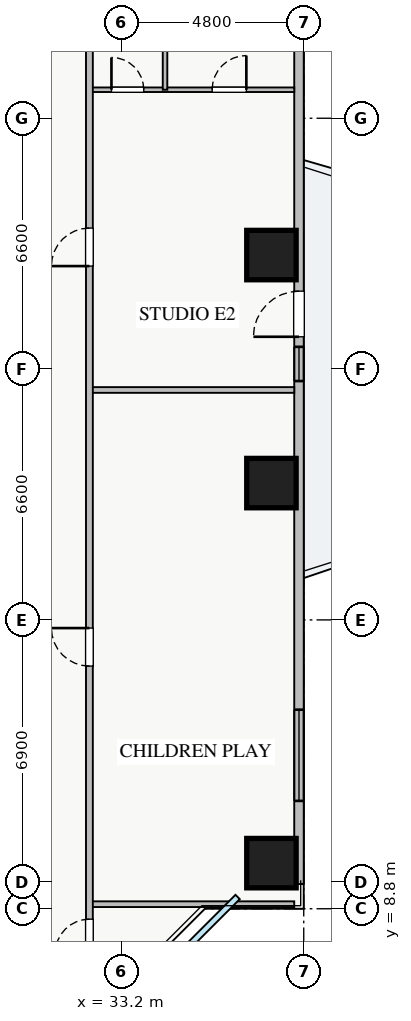
"""IFC4 building model, lengths in metres.
Left out: names, types, materials, properties, quantities, classifications, styles, units other than length and angle.
Written with IfcOpenShell. Run it as: python <this file> out.ifc"""

import sys

from ifc_helpers import new_model, si_unit, direction, frame, frame_2d, origin, origin_2d, place, context, subcontext, project, spatial, rectangle, extrude, source, transform, mapped, element, fill, save


model = new_model("IFC4")
c1 = context("Model", 3, precision=1e-05, world=origin(), true_north=direction((0.0, 1.0)))
c2 = subcontext(c1, "Body", "Model", "MODEL_VIEW")
j1 = project(units=[si_unit("LENGTHUNIT", "METRE"), si_unit("PLANEANGLEUNIT", "RADIAN")], contexts=[c1])
p1 = place(None, origin())
s1 = spatial("IfcSite", under=j1, at=p1, CompositionType="ELEMENT")
p2 = place(p1, origin())
s2 = spatial("IfcBuilding", under=s1, at=p2, CompositionType="ELEMENT")
p3 = place(p2, frame((0.0, 0.0, 63.25)))
s3 = spatial("IfcBuildingStorey", under=s2, at=p3, CompositionType="ELEMENT", Elevation=63.25)
m1 = source(origin(), c2, "Body", "SweptSolid", [
    extrude(rectangle(XDim=1.3, YDim=1.3, at=origin_2d()), origin(), (0.0, 0.0, 1.0), 3.25),
])
for number, where, z_axis, x_axis in (
    (1, (37.15, 10.0, 0.0), (0.0, 0.0, 1.0), (1.0, 0.0, 0.0)),
    (2, (37.15, 20.0, 0.0), (0.0, 0.0, 1.0), (1.0, 0.0, 0.0)),
    (3, (37.15, 26.0, 0.0), (0.0, 0.0, 1.0), (1.0, 0.0, 0.0)),
):
    element("IfcColumn", number, at=place(p3, frame(where, z_axis=z_axis, x_axis=x_axis)), inside=s3, PredefinedType="COLUMN", context=c2, shape_type="MappedRepresentation", body=[
        mapped(m1, transform((0.0, 0.0, 0.0), x_axis=(1.0, 0.0, 0.0), y_axis=(0.0, 1.0, 0.0), z_axis=(0.0, 0.0, 1.0), scale=1.0)),
    ])
p4 = place(p3, frame((37.875, 9.45, 0.0), z_axis=(0.0, 0.0, 1.0), x_axis=(0.0, 1.0, 0.0)))
e4 = element("IfcWall", 4, at=p4, inside=s3, PredefinedType="STANDARD", context=c2, shape_type="SweptSolid", body=[
    extrude(rectangle(XDim=27.1, YDim=0.25, at=frame_2d((13.55, 0.0))), origin(), (0.0, 0.0, 1.0), 2.61),
])
p5 = place(p4, frame((14.4, 0.0, 0.0)))
e5 = element("IfcOpeningElement", 5, at=p5, cuts=e4, PredefinedType="OPENING", context=c2, shape_type="SweptSolid", body=[
    extrude(rectangle(XDim=1.2, YDim=2.1, at=frame_2d((0.6, 1.05))), frame((0.0, 0.135, 0.0), z_axis=(0.0, -1.0, 0.0), x_axis=(1.0, 0.0, 0.0)), (0.0, 0.0, 1.0), 0.27),
])
p6 = place(p4, frame((2.188, 0.0, 0.9)))
e6 = element("IfcOpeningElement", 6, at=p6, cuts=e4, PredefinedType="OPENING", context=c2, shape_type="SweptSolid", body=[
    extrude(rectangle(XDim=2.4, YDim=1.48, at=frame_2d((1.2, 0.74))), frame((0.0, 0.135, 0.0), z_axis=(0.0, -1.0, 0.0), x_axis=(1.0, 0.0, 0.0)), (0.0, 0.0, 1.0), 0.27),
])
p7 = place(p4, frame((22.663, 0.0, 0.9)))
e7 = element("IfcOpeningElement", 7, at=p7, cuts=e4, PredefinedType="OPENING", context=c2, shape_type="SweptSolid", body=[
    extrude(rectangle(XDim=2.1, YDim=1.48, at=frame_2d((1.05, 0.74))), frame((0.0, 0.135, 0.0), z_axis=(0.0, -1.0, 0.0), x_axis=(1.0, 0.0, 0.0)), (0.0, 0.0, 1.0), 0.27),
])
p8 = place(p4, frame((13.235, 0.0, 0.9)))
e8 = element("IfcOpeningElement", 8, at=p8, cuts=e4, PredefinedType="OPENING", context=c2, shape_type="SweptSolid", body=[
    extrude(rectangle(XDim=0.9, YDim=1.2, at=frame_2d((0.45, 0.6))), frame((0.0, 0.135, 0.0), z_axis=(0.0, -1.0, 0.0), x_axis=(1.0, 0.0, 0.0)), (0.0, 0.0, 1.0), 0.27),
])
p9 = place(p3, frame((32.36, 8.92, 0.0), z_axis=(0.0, 0.0, 1.0), x_axis=(1.0, 0.0, 0.0)))
e9 = element("IfcWall", 9, at=p9, inside=s3, PredefinedType="PARTITIONING", context=c2, shape_type="SweptSolid", body=[
    extrude(rectangle(XDim=5.39, YDim=0.15, at=frame_2d((2.695, 0.0))), origin(), (0.0, 0.0, 1.0), 3.07),
])
p10 = place(p3, frame((32.36, 30.35, 0.0), z_axis=(0.0, 0.0, 1.0), x_axis=(1.0, 0.0, 0.0)))
e10 = element("IfcWall", 10, at=p10, inside=s3, PredefinedType="PLUMBINGWALL", context=c2, shape_type="SweptSolid", body=[
    extrude(rectangle(XDim=5.39, YDim=0.12, at=frame_2d((2.695, 0.0))), origin(), (0.0, 0.0, 1.0), 3.07),
])
p11 = place(p10, frame((0.58, 0.0, 0.0)))
e11 = element("IfcOpeningElement", 11, at=p11, cuts=e10, PredefinedType="OPENING", context=c2, shape_type="SweptSolid", body=[
    extrude(rectangle(XDim=0.85, YDim=2.05, at=frame_2d((0.425, 1.025))), frame((0.0, 0.07, 0.0), z_axis=(0.0, -1.0, 0.0), x_axis=(1.0, 0.0, 0.0)), (0.0, 0.0, 1.0), 0.14),
])
p12 = place(p10, frame((3.23, 0.0, 0.0)))
e12 = element("IfcOpeningElement", 12, at=p12, cuts=e10, PredefinedType="OPENING", context=c2, shape_type="SweptSolid", body=[
    extrude(rectangle(XDim=0.9, YDim=2.05, at=frame_2d((0.45, 1.025))), frame((0.0, 0.07, 0.0), z_axis=(0.0, -1.0, 0.0), x_axis=(1.0, 0.0, 0.0)), (0.0, 0.0, 1.0), 0.14),
])
p13 = place(p3, frame((34.35, 30.35, 0.0), z_axis=(0.0, 0.0, 1.0), x_axis=(0.0, 1.0, 0.0)))
e13 = element("IfcWall", 13, at=p13, inside=s3, PredefinedType="PLUMBINGWALL", context=c2, shape_type="SweptSolid", body=[
    extrude(rectangle(XDim=6.73, YDim=0.12, at=frame_2d((3.365, 0.0))), origin(), (0.0, 0.0, 1.0), 3.07),
])
p14 = place(p3, frame((32.36, 22.45, 0.0), z_axis=(0.0, 0.0, 1.0), x_axis=(1.0, 0.0, 0.0)))
e14 = element("IfcWall", 14, at=p14, inside=s3, PredefinedType="PARTITIONING", context=c2, shape_type="SweptSolid", body=[
    extrude(rectangle(XDim=5.39, YDim=0.15, at=frame_2d((2.695, 0.0))), origin(), (0.0, 0.0, 1.0), 3.07),
])
p15 = place(p3, frame((32.36, 7.21, 0.0), z_axis=(0.0, 0.0, 1.0), x_axis=(0.0, 1.0, 0.0)))
e15 = element("IfcWall", 15, at=p15, inside=s3, PredefinedType="PARTITIONING", context=c2, shape_type="SweptSolid", body=[
    extrude(rectangle(XDim=31.23, YDim=0.18, at=frame_2d((15.615, 0.0))), origin(), (0.0, 0.0, 1.0), 2.865),
])
p16 = place(p15, frame((30.09, 0.0, 0.0)))
e16 = element("IfcOpeningElement", 16, at=p16, cuts=e15, PredefinedType="OPENING", context=c2, shape_type="SweptSolid", body=[
    extrude(rectangle(XDim=0.9, YDim=2.05, at=frame_2d((0.45, 1.025))), frame((0.0, 0.1, 0.0), z_axis=(0.0, -1.0, 0.0), x_axis=(1.0, 0.0, 0.0)), (0.0, 0.0, 1.0), 0.2),
])
p17 = place(p15, frame((0.415, 0.0, 0.0)))
e17 = element("IfcOpeningElement", 17, at=p17, cuts=e15, PredefinedType="OPENING", context=c2, shape_type="SweptSolid", body=[
    extrude(rectangle(XDim=0.9, YDim=2.05, at=frame_2d((0.45, 1.025))), frame((0.0, 0.1, 0.0), z_axis=(0.0, -1.0, 0.0), x_axis=(1.0, 0.0, 0.0)), (0.0, 0.0, 1.0), 0.2),
])
p18 = place(p15, frame((7.975, 0.0, 0.0)))
e18 = element("IfcOpeningElement", 18, at=p18, cuts=e15, PredefinedType="OPENING", context=c2, shape_type="SweptSolid", body=[
    extrude(rectangle(XDim=1.0, YDim=2.05, at=frame_2d((0.5, 1.025))), frame((0.0, 0.1, 0.0), z_axis=(0.0, -1.0, 0.0), x_axis=(1.0, 0.0, 0.0)), (0.0, 0.0, 1.0), 0.2),
])
p19 = place(p15, frame((18.5, 0.0, 0.0)))
e19 = element("IfcOpeningElement", 19, at=p19, cuts=e15, PredefinedType="OPENING", context=c2, shape_type="SweptSolid", body=[
    extrude(rectangle(XDim=1.0, YDim=2.05, at=frame_2d((0.5, 1.025))), frame((0.0, 0.1, 0.0), z_axis=(0.0, -1.0, 0.0), x_axis=(1.0, 0.0, 0.0)), (0.0, 0.0, 1.0), 0.2),
])
m2 = source(origin(), c2, "Body", "SweptSolid", [
    extrude(rectangle(XDim=1.2, YDim=2.1, at=frame_2d((0.6, 1.05))), frame((0.0, 0.025, 0.0), z_axis=(0.0, -1.0, 0.0), x_axis=(1.0, 0.0, 0.0)), (0.0, 0.0, 1.0), 0.05),
])
p20 = place(p5, origin())
e20 = element("IfcDoor", 20, at=p20, inside=s3, OperationType="SINGLE_SWING_LEFT", PredefinedType="DOOR", context=c2, shape_type="MappedRepresentation", body=[
    mapped(m2, transform((0.0, 0.0, 0.0), x_axis=(1.0, 0.0, 0.0), y_axis=(0.0, 1.0, 0.0), z_axis=(0.0, 0.0, 1.0), scale=1.0)),
])
fill(e5, e20)
m3 = source(origin(), c2, "Body", "SweptSolid", [
    extrude(rectangle(XDim=2.4, YDim=1.48, at=frame_2d((1.2, 0.74))), frame((0.0, 0.03, 0.0), z_axis=(0.0, -1.0, 0.0), x_axis=(1.0, 0.0, 0.0)), (0.0, 0.0, 1.0), 0.06),
])
p21 = place(p6, origin())
e21 = element("IfcWindow", 21, at=p21, inside=s3, PartitioningType="TRIPLE_PANEL_VERTICAL", PredefinedType="WINDOW", context=c2, shape_type="MappedRepresentation", body=[
    mapped(m3, transform((0.0, 0.0, 0.0), x_axis=(1.0, 0.0, 0.0), y_axis=(0.0, 1.0, 0.0), z_axis=(0.0, 0.0, 1.0), scale=1.0)),
])
fill(e6, e21)
m4 = source(origin(), c2, "Body", "SweptSolid", [
    extrude(rectangle(XDim=0.85, YDim=2.05, at=frame_2d((0.425, 1.025))), frame((0.0, 0.025, 0.0), z_axis=(0.0, -1.0, 0.0), x_axis=(1.0, 0.0, 0.0)), (0.0, 0.0, 1.0), 0.05),
])
p22 = place(p11, origin())
e22 = element("IfcDoor", 22, at=p22, inside=s3, OperationType="SINGLE_SWING_LEFT", PredefinedType="DOOR", context=c2, shape_type="MappedRepresentation", body=[
    mapped(m4, transform((0.0, 0.0, 0.0), x_axis=(1.0, 0.0, 0.0), y_axis=(0.0, 1.0, 0.0), z_axis=(0.0, 0.0, 1.0), scale=1.0)),
])
fill(e11, e22)
m5 = source(origin(), c2, "Body", "SweptSolid", [
    extrude(rectangle(XDim=0.9, YDim=2.05, at=frame_2d((0.45, 1.025))), frame((0.0, 0.025, 0.0), z_axis=(0.0, -1.0, 0.0), x_axis=(1.0, 0.0, 0.0)), (0.0, 0.0, 1.0), 0.05),
])
p23 = place(p12, origin())
e23 = element("IfcDoor", 23, at=p23, inside=s3, OperationType="SINGLE_SWING_RIGHT", PredefinedType="DOOR", context=c2, shape_type="MappedRepresentation", body=[
    mapped(m5, transform((0.0, 0.0, 0.0), x_axis=(1.0, 0.0, 0.0), y_axis=(0.0, 1.0, 0.0), z_axis=(0.0, 0.0, 1.0), scale=1.0)),
])
fill(e12, e23)
p24 = place(p17, origin())
e24 = element("IfcDoor", 24, at=p24, inside=s3, OperationType="SINGLE_SWING_LEFT", PredefinedType="DOOR", context=c2, shape_type="MappedRepresentation", body=[
    mapped(m5, transform((0.0, 0.0, 0.0), x_axis=(1.0, 0.0, 0.0), y_axis=(0.0, 1.0, 0.0), z_axis=(0.0, 0.0, 1.0), scale=1.0)),
])
fill(e17, e24)
m6 = source(origin(), c2, "Body", "SweptSolid", [
    extrude(rectangle(XDim=1.0, YDim=2.05, at=frame_2d((0.5, 1.025))), frame((0.0, 0.025, 0.0), z_axis=(0.0, -1.0, 0.0), x_axis=(1.0, 0.0, 0.0)), (0.0, 0.0, 1.0), 0.05),
])
p25 = place(p18, origin())
e25 = element("IfcDoor", 25, at=p25, inside=s3, OperationType="SINGLE_SWING_RIGHT", PredefinedType="DOOR", context=c2, shape_type="MappedRepresentation", body=[
    mapped(m6, transform((0.0, 0.0, 0.0), x_axis=(1.0, 0.0, 0.0), y_axis=(0.0, 1.0, 0.0), z_axis=(0.0, 0.0, 1.0), scale=1.0)),
])
fill(e18, e25)
p26 = place(p19, origin())
e26 = element("IfcDoor", 26, at=p26, inside=s3, OperationType="SINGLE_SWING_LEFT", PredefinedType="DOOR", context=c2, shape_type="MappedRepresentation", body=[
    mapped(m6, transform((0.0, 0.0, 0.0), x_axis=(1.0, 0.0, 0.0), y_axis=(0.0, 1.0, 0.0), z_axis=(0.0, 0.0, 1.0), scale=1.0)),
])
fill(e19, e26)
m7 = source(origin(), c2, "Body", "SweptSolid", [
    extrude(rectangle(XDim=0.9, YDim=1.2, at=frame_2d((0.45, 0.6))), frame((0.0, 0.03, 0.0), z_axis=(0.0, -1.0, 0.0), x_axis=(1.0, 0.0, 0.0)), (0.0, 0.0, 1.0), 0.06),
])
p27 = place(p8, origin())
e27 = element("IfcWindow", 27, at=p27, inside=s3, PartitioningType="SINGLE_PANEL", PredefinedType="WINDOW", context=c2, shape_type="MappedRepresentation", body=[
    mapped(m7, transform((0.0, 0.0, 0.0), x_axis=(1.0, 0.0, 0.0), y_axis=(0.0, 1.0, 0.0), z_axis=(0.0, 0.0, 1.0), scale=1.0)),
])
fill(e8, e27)
save(model, sys.argv[1])
